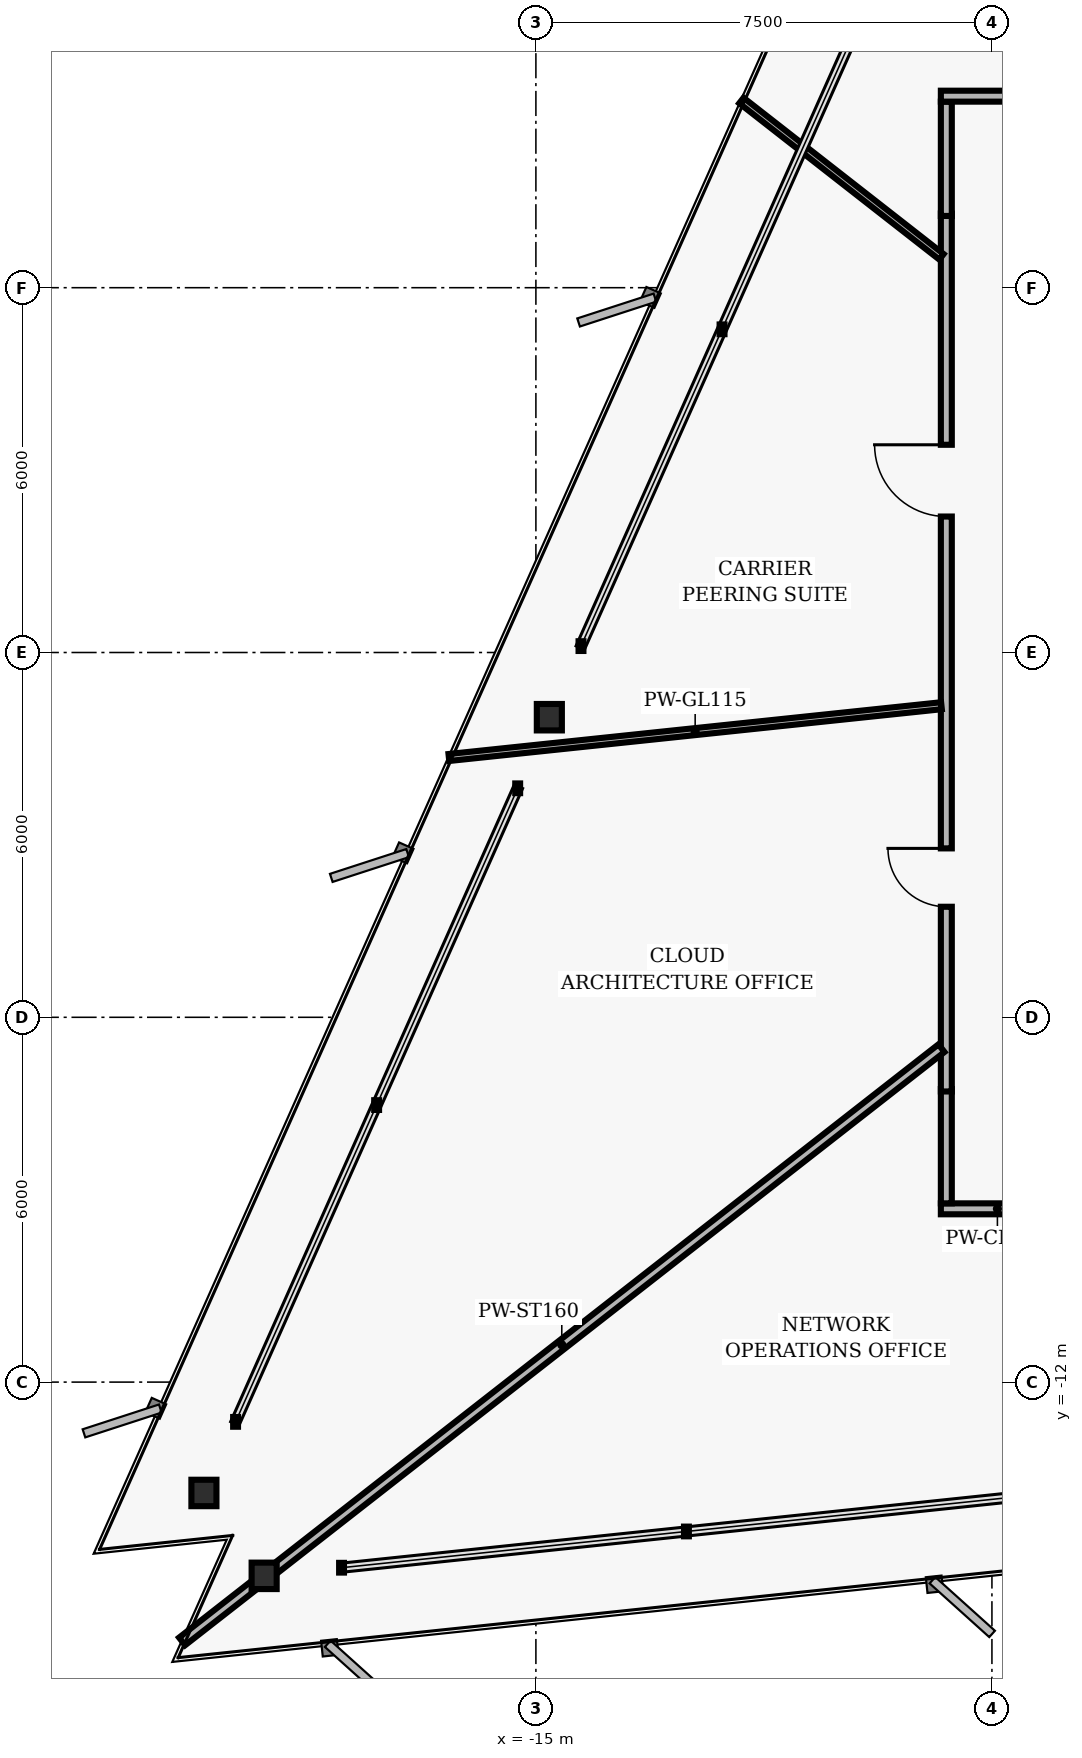
"""IFC4 building model, lengths in metres.
Left out: names, types, materials, properties, quantities, classifications, styles, units other than length and angle.
Written with IfcOpenShell. Run it as: python <this file> out.ifc"""

import sys

from ifc_helpers import new_model, si_unit, direction, frame, frame_2d, origin, origin_2d, place, context, subcontext, project, spatial, rectangle, i_section, extrude, element, fill, save


model = new_model("IFC4")
c1 = context("Model", 3, precision=1e-05, world=origin(), true_north=direction((0.0, 1.0)))
c2 = subcontext(c1, "Body", "Model", "MODEL_VIEW")
j1 = project(units=[si_unit("LENGTHUNIT", "METRE"), si_unit("PLANEANGLEUNIT", "RADIAN")], contexts=[c1])
p1 = place(None, origin())
s1 = spatial("IfcSite", under=j1, at=p1, CompositionType="ELEMENT")
p2 = place(p1, origin())
s2 = spatial("IfcBuilding", under=s1, at=p2, CompositionType="ELEMENT")
p3 = place(p2, frame((0.0, 0.0, 110.72)))
s3 = spatial("IfcBuildingStorey", under=s2, at=p3, CompositionType="ELEMENT", Elevation=110.72)
for number, where, z_axis, x_axis in (
    (1, (-14.779, -1.064, 0.0), (0.0, 0.0, 1.0), (1.0, 0.0, 0.0)),
    (2, (-20.46, -13.823, 0.0), (0.0, 0.0, 1.0), (1.0, 0.0, 0.0)),
    (3, (-19.469, -15.187, 0.0), (0.0, 0.0, 1.0), (1.0, 0.0, 0.0)),
):
    element("IfcColumn", number, at=place(p3, frame(where, z_axis=z_axis, x_axis=x_axis)), inside=s3, PredefinedType="COLUMN", context=c2, shape_type="SweptSolid", body=[
        extrude(i_section(OverallWidth=0.412, OverallDepth=0.435, WebThickness=0.036, FlangeThickness=0.057, FilletRadius=0.022, at=origin_2d()), origin(), (0.0, 0.0, 1.0), 3.04),
    ])
p4 = place(p3, frame((-6.48, -9.15, 0.0), z_axis=(0.0, 0.0, 1.0), x_axis=(-1.0, 0.0, 0.0)))
e4 = element("IfcWall", 4, at=p4, inside=s3, PredefinedType="PARTITIONING", context=c2, shape_type="SweptSolid", body=[
    extrude(rectangle(XDim=1.86, YDim=0.18, at=frame_2d((0.93, 0.0))), origin(), (0.0, 0.0, 1.0), 2.33),
])
p5 = place(p3, frame((-8.25, -9.06, 0.0), z_axis=(0.0, 0.0, 1.0), x_axis=(0.0, 1.0, 0.0)))
e5 = element("IfcWall", 5, at=p5, inside=s3, PredefinedType="PARTITIONING", context=c2, shape_type="SweptSolid", body=[
    extrude(rectangle(XDim=1.88, YDim=0.18, at=frame_2d((0.94, 0.0))), origin(), (0.0, 0.0, 1.0), 2.763),
])
p6 = place(p3, frame((-8.25, -7.22, 0.0), z_axis=(0.0, 0.0, 1.0), x_axis=(0.0, 1.0, 0.0)))
e6 = element("IfcWall", 6, at=p6, inside=s3, PredefinedType="PARTITIONING", context=c2, shape_type="SweptSolid", body=[
    extrude(rectangle(XDim=14.44, YDim=0.18, at=frame_2d((7.22, 0.0))), origin(), (0.0, 0.0, 1.0), 2.33),
])
p7 = place(p6, frame((3.038, 0.0, 0.0)))
e7 = element("IfcOpeningElement", 7, at=p7, cuts=e6, PredefinedType="OPENING", context=c2, shape_type="SweptSolid", body=[
    extrude(rectangle(XDim=0.96, YDim=2.02, at=frame_2d((0.48, 1.01))), frame((0.0, 0.1, 0.0), z_axis=(0.0, -1.0, 0.0), x_axis=(1.0, 0.0, 0.0)), (0.0, 0.0, 1.0), 0.2),
])
p8 = place(p6, frame((9.456, 0.0, 0.0)))
e8 = element("IfcOpeningElement", 8, at=p8, cuts=e6, PredefinedType="OPENING", context=c2, shape_type="SweptSolid", body=[
    extrude(rectangle(XDim=1.18, YDim=2.02, at=frame_2d((0.59, 1.01))), frame((0.0, 0.1, 0.0), z_axis=(0.0, -1.0, 0.0), x_axis=(1.0, 0.0, 0.0)), (0.0, 0.0, 1.0), 0.2),
])
p9 = place(p3, frame((-8.25, 7.18, 0.0), z_axis=(0.0, 0.0, 1.0), x_axis=(0.0, 1.0, 0.0)))
e9 = element("IfcWall", 9, at=p9, inside=s3, PredefinedType="PARTITIONING", context=c2, shape_type="SweptSolid", body=[
    extrude(rectangle(XDim=1.88, YDim=0.18, at=frame_2d((0.94, 0.0))), origin(), (0.0, 0.0, 1.0), 2.763),
])
p10 = place(p3, frame((-8.34, 9.15, 0.0), z_axis=(0.0, 0.0, 1.0), x_axis=(1.0, 0.0, 0.0)))
e10 = element("IfcWall", 10, at=p10, inside=s3, PredefinedType="PARTITIONING", context=c2, shape_type="SweptSolid", body=[
    extrude(rectangle(XDim=1.86, YDim=0.18, at=frame_2d((0.93, 0.0))), origin(), (0.0, 0.0, 1.0), 2.763),
])
p11 = place(p3, frame((-8.33, -0.875, 0.0), z_axis=(0.0, 0.0, 1.0), x_axis=(-0.994520879121, -0.104538131765, 0.0)))
e11 = element("IfcWall", 11, at=p11, inside=s3, PredefinedType="MOVABLE", context=c2, shape_type="SweptSolid", body=[
    extrude(rectangle(XDim=8.146, YDim=0.115, at=frame_2d((4.073, 0.0))), origin(), (0.0, 0.0, 1.0), 2.763),
])
p12 = place(p3, frame((-8.33, -6.508, 0.0), z_axis=(0.0, 0.0, 1.0), x_axis=(-0.788011528275, -0.615660483794, 0.0)))
e12 = element("IfcWall", 12, at=p12, inside=s3, PredefinedType="PARTITIONING", context=c2, shape_type="SweptSolid", body=[
    extrude(rectangle(XDim=15.848, YDim=0.16, at=frame_2d((7.924, 0.0))), origin(), (0.0, 0.0, 1.0), 2.132),
])
p13 = place(p3, frame((-8.33, 6.508, 0.0), z_axis=(0.0, 0.0, 1.0), x_axis=(-0.787993347372, 0.615683753641, 0.0)))
e13 = element("IfcWall", 13, at=p13, inside=s3, PredefinedType="MOVABLE", context=c2, shape_type="SweptSolid", body=[
    extrude(rectangle(XDim=4.176, YDim=0.115, at=frame_2d((2.088, 0.0))), origin(), (0.0, 0.0, 1.0), 2.763),
])
p14 = place(p7, origin())
e14 = element("IfcDoor", 14, at=p14, inside=s3, OperationType="SINGLE_SWING_RIGHT", PredefinedType="DOOR", context=c2, shape_type="SweptSolid", body=[
    extrude(rectangle(XDim=0.96, YDim=2.02, at=frame_2d((0.48, 1.01))), frame((0.0, 0.025, 0.0), z_axis=(0.0, -1.0, 0.0), x_axis=(1.0, 0.0, 0.0)), (0.0, 0.0, 1.0), 0.05),
])
fill(e7, e14)
p15 = place(p8, origin())
e15 = element("IfcDoor", 15, at=p15, inside=s3, OperationType="SINGLE_SWING_RIGHT", PredefinedType="DOOR", context=c2, shape_type="SweptSolid", body=[
    extrude(rectangle(XDim=1.18, YDim=2.02, at=frame_2d((0.59, 1.01))), frame((0.0, 0.025, 0.0), z_axis=(0.0, -1.0, 0.0), x_axis=(1.0, 0.0, 0.0)), (0.0, 0.0, 1.0), 0.05),
])
fill(e8, e15)
save(model, sys.argv[1])
